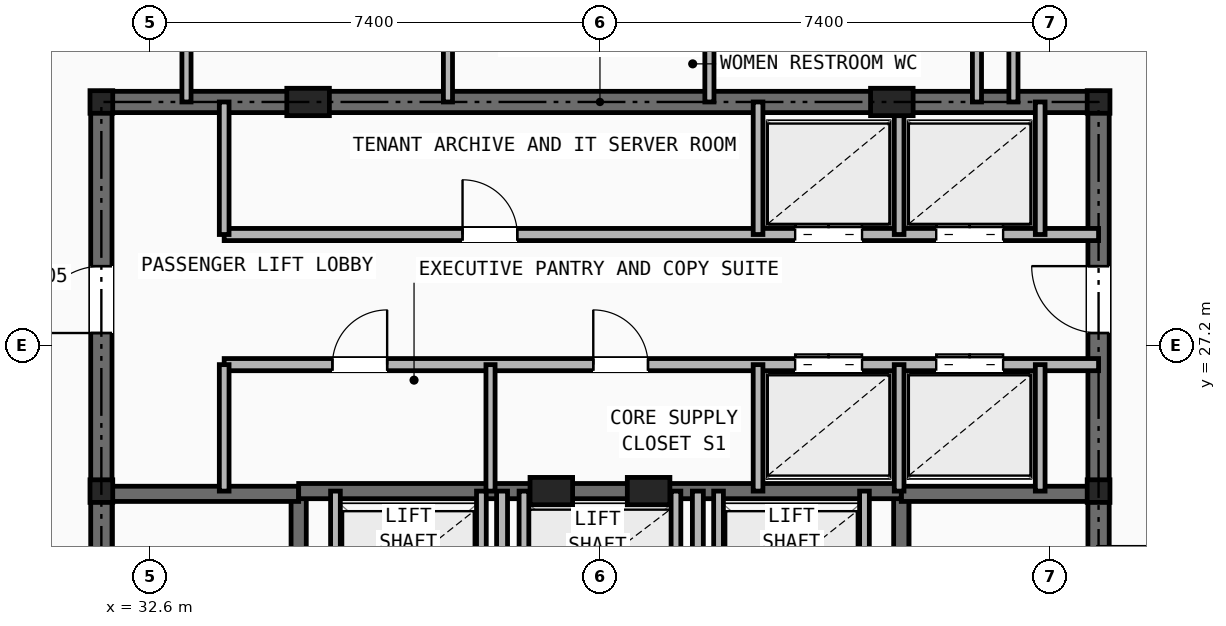
"""IFC4 building model, lengths in metres.
Left out: names, types, materials, properties, quantities, classifications, styles, units other than length and angle.
Written with IfcOpenShell. Run it as: python <this file> out.ifc"""

import sys

from ifc_helpers import new_model, si_unit, direction, frame, frame_2d, origin, origin_2d, place, context, subcontext, project, spatial, rectangle, i_section, extrude, element, fill, save


model = new_model("IFC4")
c1 = context("Model", 3, precision=1e-05, world=origin(), true_north=direction((0.0, 1.0)))
c2 = subcontext(c1, "Body", "Model", "MODEL_VIEW")
j1 = project(units=[si_unit("LENGTHUNIT", "METRE"), si_unit("PLANEANGLEUNIT", "RADIAN")], contexts=[c1])
p1 = place(None, origin())
s1 = spatial("IfcSite", under=j1, at=p1, CompositionType="ELEMENT")
p2 = place(p1, origin())
s2 = spatial("IfcBuilding", under=s1, at=p2, CompositionType="ELEMENT")
p3 = place(p2, frame((0.0, 0.0, 225.9)))
s3 = spatial("IfcBuildingStorey", under=s2, at=p3, CompositionType="ELEMENT", Elevation=225.9)
for number, where, z_axis, x_axis in (
    (1, (31.8, 24.8, 0.0), (0.0, 0.0, 1.0), (1.0, 0.0, 0.0)),
    (2, (48.2, 24.8, 0.0), (0.0, 0.0, 1.0), (1.0, 0.0, 0.0)),
    (3, (31.8, 31.2, 0.0), (0.0, 0.0, 1.0), (1.0, 0.0, 0.0)),
    (4, (48.2, 31.2, 0.0), (0.0, 0.0, 1.0), (1.0, 0.0, 0.0)),
):
    element("IfcColumn", number, at=place(p3, frame(where, z_axis=z_axis, x_axis=x_axis)), inside=s3, PredefinedType="COLUMN", context=c2, shape_type="SweptSolid", body=[
        extrude(i_section(OverallWidth=0.374, OverallDepth=0.372, WebThickness=0.016, FlangeThickness=0.026, at=origin_2d()), origin(), (0.0, 0.0, 1.0), 3.5),
    ])
for number, where, z_axis, x_axis in (
    (5, (35.2, 31.2, 0.0), (0.0, 0.0, 1.0), (1.0, 0.0, 0.0)),
    (6, (44.8, 31.2, 0.0), (0.0, 0.0, 1.0), (1.0, 0.0, 0.0)),
    (7, (39.2, 24.8, 0.0), (0.0, 0.0, 1.0), (1.0, 0.0, 0.0)),
    (8, (40.8, 24.8, 0.0), (0.0, 0.0, 1.0), (1.0, 0.0, 0.0)),
):
    element("IfcColumn", number, at=place(p3, frame(where, z_axis=z_axis, x_axis=x_axis)), inside=s3, PredefinedType="PILASTER", context=c2, shape_type="SweptSolid", body=[
        extrude(rectangle(XDim=0.7, YDim=0.45, at=origin_2d()), origin(), (0.0, 0.0, 1.0), 3.5),
    ])
p4 = place(p3, frame((31.8, 31.2, 0.0), z_axis=(0.0, 0.0, 1.0), x_axis=(1.0, 0.0, 0.0)))
e9 = element("IfcWall", 9, at=p4, inside=s3, PredefinedType="SHEAR", context=c2, shape_type="SweptSolid", body=[
    extrude(rectangle(XDim=16.4, YDim=0.35, at=frame_2d((8.2, 0.0))), origin(), (0.0, 0.0, 1.0), 3.25),
])
p5 = place(p3, frame((31.8, 16.4, 0.0), z_axis=(0.0, 0.0, 1.0), x_axis=(0.0, 1.0, 0.0)))
e10 = element("IfcWall", 10, at=p5, inside=s3, PredefinedType="SHEAR", context=c2, shape_type="SweptSolid", body=[
    extrude(rectangle(XDim=14.8, YDim=0.35, at=frame_2d((7.4, 0.0))), origin(), (0.0, 0.0, 1.0), 3.25),
])
p6 = place(p5, frame((11.0, 0.0, 0.0)))
e11 = element("IfcOpeningElement", 11, at=p6, cuts=e10, PredefinedType="OPENING", context=c2, shape_type="SweptSolid", body=[
    extrude(rectangle(XDim=1.1, YDim=2.15, at=frame_2d((0.55, 1.075))), frame((0.0, 0.185, 0.0), z_axis=(0.0, -1.0, 0.0), x_axis=(1.0, 0.0, 0.0)), (0.0, 0.0, 1.0), 0.37),
])
p7 = place(p3, frame((48.2, 16.4, 0.0), z_axis=(0.0, 0.0, 1.0), x_axis=(0.0, 1.0, 0.0)))
e12 = element("IfcWall", 12, at=p7, inside=s3, PredefinedType="SHEAR", context=c2, shape_type="SweptSolid", body=[
    extrude(rectangle(XDim=14.8, YDim=0.35, at=frame_2d((7.4, 0.0))), origin(), (0.0, 0.0, 1.0), 3.25),
])
p8 = place(p7, frame((11.0, 0.0, 0.0)))
e13 = element("IfcOpeningElement", 13, at=p8, cuts=e12, PredefinedType="OPENING", context=c2, shape_type="SweptSolid", body=[
    extrude(rectangle(XDim=1.1, YDim=2.15, at=frame_2d((0.55, 1.075))), frame((0.0, 0.185, 0.0), z_axis=(0.0, -1.0, 0.0), x_axis=(1.0, 0.0, 0.0)), (0.0, 0.0, 1.0), 0.37),
])
p9 = place(p3, frame((35.045, 16.4, 0.0), z_axis=(0.0, 0.0, 1.0), x_axis=(0.0, 1.0, 0.0)))
e14 = element("IfcWall", 14, at=p9, inside=s3, PredefinedType="SHEAR", context=c2, shape_type="SweptSolid", body=[
    extrude(rectangle(XDim=8.4, YDim=0.25, at=frame_2d((4.2, 0.0))), origin(), (0.0, 0.0, 1.0), 3.25),
])
p10 = place(p9, frame((0.45, 0.0, 0.0)))
e15 = element("IfcOpeningElement", 15, at=p10, cuts=e14, PredefinedType="OPENING", context=c2, shape_type="SweptSolid", body=[
    extrude(rectangle(XDim=0.95, YDim=2.1, at=frame_2d((0.475, 1.05))), frame((0.0, 0.135, 0.0), z_axis=(0.0, -1.0, 0.0), x_axis=(1.0, 0.0, 0.0)), (0.0, 0.0, 1.0), 0.27),
])
p11 = place(p3, frame((31.8, 24.755, 0.0), z_axis=(0.0, 0.0, 1.0), x_axis=(1.0, 0.0, 0.0)))
e16 = element("IfcWall", 16, at=p11, inside=s3, PredefinedType="SHEAR", context=c2, shape_type="SweptSolid", body=[
    extrude(rectangle(XDim=3.245, YDim=0.25, at=frame_2d((1.623, 0.0))), origin(), (0.0, 0.0, 1.0), 3.25),
])
p12 = place(p3, frame((44.955, 16.4, 0.0), z_axis=(0.0, 0.0, 1.0), x_axis=(0.0, 1.0, 0.0)))
e17 = element("IfcWall", 17, at=p12, inside=s3, PredefinedType="SHEAR", context=c2, shape_type="SweptSolid", body=[
    extrude(rectangle(XDim=8.4, YDim=0.25, at=frame_2d((4.2, 0.0))), origin(), (0.0, 0.0, 1.0), 3.25),
])
p13 = place(p12, frame((0.45, 0.0, 0.0)))
e18 = element("IfcOpeningElement", 18, at=p13, cuts=e17, PredefinedType="OPENING", context=c2, shape_type="SweptSolid", body=[
    extrude(rectangle(XDim=0.95, YDim=2.1, at=frame_2d((0.475, 1.05))), frame((0.0, 0.135, 0.0), z_axis=(0.0, -1.0, 0.0), x_axis=(1.0, 0.0, 0.0)), (0.0, 0.0, 1.0), 0.27),
])
p14 = place(p3, frame((44.955, 24.755, 0.0), z_axis=(0.0, 0.0, 1.0), x_axis=(1.0, 0.0, 0.0)))
e19 = element("IfcWall", 19, at=p14, inside=s3, PredefinedType="SHEAR", context=c2, shape_type="SweptSolid", body=[
    extrude(rectangle(XDim=3.245, YDim=0.25, at=frame_2d((1.623, 0.0))), origin(), (0.0, 0.0, 1.0), 3.25),
])
p15 = place(p3, frame((35.045, 24.8, 0.0), z_axis=(0.0, 0.0, 1.0), x_axis=(1.0, 0.0, 0.0)))
e20 = element("IfcWall", 20, at=p15, inside=s3, PredefinedType="SHEAR", context=c2, shape_type="SweptSolid", body=[
    extrude(rectangle(XDim=9.91, YDim=0.25, at=frame_2d((4.955, 0.0))), origin(), (0.0, 0.0, 1.0), 3.25),
])
p16 = place(p3, frame((38.39, 16.4, 0.0), z_axis=(0.0, 0.0, 1.0), x_axis=(0.0, 1.0, 0.0)))
e21 = element("IfcWall", 21, at=p16, inside=s3, PredefinedType="PARTITIONING", context=c2, shape_type="SweptSolid", body=[
    extrude(rectangle(XDim=8.4, YDim=0.18, at=frame_2d((4.2, 0.0))), origin(), (0.0, 0.0, 1.0), 2.705),
])
p17 = place(p16, frame((1.8, 0.0, 0.0)))
e22 = element("IfcOpeningElement", 22, at=p17, cuts=e21, PredefinedType="OPENING", context=c2, shape_type="SweptSolid", body=[
    extrude(rectangle(XDim=0.85, YDim=2.05, at=frame_2d((0.425, 1.025))), frame((0.0, 0.1, 0.0), z_axis=(0.0, -1.0, 0.0), x_axis=(1.0, 0.0, 0.0)), (0.0, 0.0, 1.0), 0.2),
])
p18 = place(p16, frame((4.35, 0.0, 0.0)))
e23 = element("IfcOpeningElement", 23, at=p18, cuts=e21, PredefinedType="OPENING", context=c2, shape_type="SweptSolid", body=[
    extrude(rectangle(XDim=0.95, YDim=2.1, at=frame_2d((0.475, 1.05))), frame((0.0, 0.1, 0.0), z_axis=(0.0, -1.0, 0.0), x_axis=(1.0, 0.0, 0.0)), (0.0, 0.0, 1.0), 0.2),
])
p19 = place(p3, frame((41.61, 16.4, 0.0), z_axis=(0.0, 0.0, 1.0), x_axis=(0.0, 1.0, 0.0)))
e24 = element("IfcWall", 24, at=p19, inside=s3, PredefinedType="PARTITIONING", context=c2, shape_type="SweptSolid", body=[
    extrude(rectangle(XDim=8.4, YDim=0.18, at=frame_2d((4.2, 0.0))), origin(), (0.0, 0.0, 1.0), 2.705),
])
p20 = place(p19, frame((1.8, 0.0, 0.0)))
e25 = element("IfcOpeningElement", 25, at=p20, cuts=e24, PredefinedType="OPENING", context=c2, shape_type="SweptSolid", body=[
    extrude(rectangle(XDim=0.85, YDim=2.05, at=frame_2d((0.425, 1.025))), frame((0.0, 0.1, 0.0), z_axis=(0.0, -1.0, 0.0), x_axis=(1.0, 0.0, 0.0)), (0.0, 0.0, 1.0), 0.2),
])
for number, where, z_axis, x_axis in (
    (26, (35.65, 22.48, 0.0), (0.0, 0.0, 1.0), (0.0, 1.0, 0.0)),
    (27, (38.05, 22.48, 0.0), (0.0, 0.0, 1.0), (0.0, 1.0, 0.0)),
    (28, (41.95, 22.48, 0.0), (0.0, 0.0, 1.0), (0.0, 1.0, 0.0)),
    (29, (44.35, 22.48, 0.0), (0.0, 0.0, 1.0), (0.0, 1.0, 0.0)),
    (30, (38.75, 22.48, 0.0), (0.0, 0.0, 1.0), (0.0, 1.0, 0.0)),
    (31, (41.25, 22.48, 0.0), (0.0, 0.0, 1.0), (0.0, 1.0, 0.0)),
):
    element("IfcWall", number, at=place(p3, frame(where, z_axis=z_axis, x_axis=x_axis)), inside=s3, PredefinedType="SOLIDWALL", context=c2, shape_type="SweptSolid", body=[
        extrude(rectangle(XDim=2.32, YDim=0.16, at=frame_2d((1.16, 0.0))), origin(), (0.0, 0.0, 1.0), 3.25),
    ])
p21 = place(p3, frame((33.82, 29.02, 0.0), z_axis=(0.0, 0.0, 1.0), x_axis=(1.0, 0.0, 0.0)))
e32 = element("IfcWall", 32, at=p21, inside=s3, PredefinedType="SOLIDWALL", context=c2, shape_type="SweptSolid", body=[
    extrude(rectangle(XDim=14.38, YDim=0.2, at=frame_2d((7.19, 0.0))), origin(), (0.0, 0.0, 1.0), 2.705),
])
p22 = place(p21, frame((3.92, 0.0, 0.0)))
e33 = element("IfcOpeningElement", 33, at=p22, cuts=e32, PredefinedType="OPENING", context=c2, shape_type="SweptSolid", body=[
    extrude(rectangle(XDim=0.9, YDim=2.1, at=frame_2d((0.45, 1.05))), frame((0.0, 0.11, 0.0), z_axis=(0.0, -1.0, 0.0), x_axis=(1.0, 0.0, 0.0)), (0.0, 0.0, 1.0), 0.22),
])
p23 = place(p21, frame((9.39, 0.0, 0.0)))
e34 = element("IfcOpeningElement", 34, at=p23, cuts=e32, PredefinedType="OPENING", context=c2, shape_type="SweptSolid", body=[
    extrude(rectangle(XDim=1.1, YDim=2.15, at=frame_2d((0.55, 1.075))), frame((0.0, 0.11, 0.0), z_axis=(0.0, -1.0, 0.0), x_axis=(1.0, 0.0, 0.0)), (0.0, 0.0, 1.0), 0.22),
])
p24 = place(p21, frame((11.71, 0.0, 0.0)))
e35 = element("IfcOpeningElement", 35, at=p24, cuts=e32, PredefinedType="OPENING", context=c2, shape_type="SweptSolid", body=[
    extrude(rectangle(XDim=1.1, YDim=2.15, at=frame_2d((0.55, 1.075))), frame((0.0, 0.11, 0.0), z_axis=(0.0, -1.0, 0.0), x_axis=(1.0, 0.0, 0.0)), (0.0, 0.0, 1.0), 0.22),
])
p25 = place(p3, frame((33.82, 26.88, 0.0), z_axis=(0.0, 0.0, 1.0), x_axis=(1.0, 0.0, 0.0)))
e36 = element("IfcWall", 36, at=p25, inside=s3, PredefinedType="SOLIDWALL", context=c2, shape_type="SweptSolid", body=[
    extrude(rectangle(XDim=14.38, YDim=0.2, at=frame_2d((7.19, 0.0))), origin(), (0.0, 0.0, 1.0), 2.705),
])
p26 = place(p25, frame((1.78, 0.0, 0.0)))
e37 = element("IfcOpeningElement", 37, at=p26, cuts=e36, PredefinedType="OPENING", context=c2, shape_type="SweptSolid", body=[
    extrude(rectangle(XDim=0.9, YDim=2.1, at=frame_2d((0.45, 1.05))), frame((0.0, 0.11, 0.0), z_axis=(0.0, -1.0, 0.0), x_axis=(1.0, 0.0, 0.0)), (0.0, 0.0, 1.0), 0.22),
])
p27 = place(p25, frame((6.07, 0.0, 0.0)))
e38 = element("IfcOpeningElement", 38, at=p27, cuts=e36, PredefinedType="OPENING", context=c2, shape_type="SweptSolid", body=[
    extrude(rectangle(XDim=0.9, YDim=2.1, at=frame_2d((0.45, 1.05))), frame((0.0, 0.11, 0.0), z_axis=(0.0, -1.0, 0.0), x_axis=(1.0, 0.0, 0.0)), (0.0, 0.0, 1.0), 0.22),
])
p28 = place(p25, frame((9.39, 0.0, 0.0)))
e39 = element("IfcOpeningElement", 39, at=p28, cuts=e36, PredefinedType="OPENING", context=c2, shape_type="SweptSolid", body=[
    extrude(rectangle(XDim=1.1, YDim=2.15, at=frame_2d((0.55, 1.075))), frame((0.0, 0.11, 0.0), z_axis=(0.0, -1.0, 0.0), x_axis=(1.0, 0.0, 0.0)), (0.0, 0.0, 1.0), 0.22),
])
p29 = place(p25, frame((11.71, 0.0, 0.0)))
e40 = element("IfcOpeningElement", 40, at=p29, cuts=e36, PredefinedType="OPENING", context=c2, shape_type="SweptSolid", body=[
    extrude(rectangle(XDim=1.1, YDim=2.15, at=frame_2d((0.55, 1.075))), frame((0.0, 0.11, 0.0), z_axis=(0.0, -1.0, 0.0), x_axis=(1.0, 0.0, 0.0)), (0.0, 0.0, 1.0), 0.22),
])
p30 = place(p3, frame((33.82, 29.02, 0.0), z_axis=(0.0, 0.0, 1.0), x_axis=(0.0, 1.0, 0.0)))
e41 = element("IfcWall", 41, at=p30, inside=s3, PredefinedType="SOLIDWALL", context=c2, shape_type="SweptSolid", body=[
    extrude(rectangle(XDim=2.18, YDim=0.16, at=frame_2d((1.09, 0.0))), origin(), (0.0, 0.0, 1.0), 2.705),
])
p31 = place(p3, frame((33.82, 24.8, 0.0), z_axis=(0.0, 0.0, 1.0), x_axis=(0.0, 1.0, 0.0)))
e42 = element("IfcWall", 42, at=p31, inside=s3, PredefinedType="SOLIDWALL", context=c2, shape_type="SweptSolid", body=[
    extrude(rectangle(XDim=2.08, YDim=0.16, at=frame_2d((1.04, 0.0))), origin(), (0.0, 0.0, 1.0), 3.25),
])
p32 = place(p3, frame((38.2, 24.8, 0.0), z_axis=(0.0, 0.0, 1.0), x_axis=(0.0, 1.0, 0.0)))
e43 = element("IfcWall", 43, at=p32, inside=s3, PredefinedType="PARTITIONING", context=c2, shape_type="SweptSolid", body=[
    extrude(rectangle(XDim=2.08, YDim=0.15, at=frame_2d((1.04, 0.0))), origin(), (0.0, 0.0, 1.0), 3.25),
])
for number, where, z_axis, x_axis in (
    (44, (42.6, 29.02, 0.0), (0.0, 0.0, 1.0), (0.0, 1.0, 0.0)),
    (45, (44.92, 29.02, 0.0), (0.0, 0.0, 1.0), (0.0, 1.0, 0.0)),
    (46, (47.24, 29.02, 0.0), (0.0, 0.0, 1.0), (0.0, 1.0, 0.0)),
):
    element("IfcWall", number, at=place(p3, frame(where, z_axis=z_axis, x_axis=x_axis)), inside=s3, PredefinedType="SOLIDWALL", context=c2, shape_type="SweptSolid", body=[
        extrude(rectangle(XDim=2.18, YDim=0.16, at=frame_2d((1.09, 0.0))), origin(), (0.0, 0.0, 1.0), 2.705),
    ])
for number, where, z_axis, x_axis in (
    (47, (42.6, 24.8, 0.0), (0.0, 0.0, 1.0), (0.0, 1.0, 0.0)),
    (48, (44.92, 24.8, 0.0), (0.0, 0.0, 1.0), (0.0, 1.0, 0.0)),
    (49, (47.24, 24.8, 0.0), (0.0, 0.0, 1.0), (0.0, 1.0, 0.0)),
):
    element("IfcWall", number, at=place(p3, frame(where, z_axis=z_axis, x_axis=x_axis)), inside=s3, PredefinedType="SOLIDWALL", context=c2, shape_type="SweptSolid", body=[
        extrude(rectangle(XDim=2.08, YDim=0.16, at=frame_2d((1.04, 0.0))), origin(), (0.0, 0.0, 1.0), 3.25),
    ])
for number, where, z_axis, x_axis in (
    (50, (33.2, 31.2, 0.0), (0.0, 0.0, 1.0), (0.0, 1.0, 0.0)),
    (51, (46.2, 31.2, 0.0), (0.0, 0.0, 1.0), (0.0, 1.0, 0.0)),
    (52, (37.5, 31.2, 0.0), (0.0, 0.0, 1.0), (0.0, 1.0, 0.0)),
    (53, (41.8, 31.2, 0.0), (0.0, 0.0, 1.0), (0.0, 1.0, 0.0)),
):
    element("IfcWall", number, at=place(p3, frame(where, z_axis=z_axis, x_axis=x_axis)), inside=s3, PredefinedType="PARTITIONING", context=c2, shape_type="SweptSolid", body=[
        extrude(rectangle(XDim=2.6, YDim=0.15, at=frame_2d((1.3, 0.0))), origin(), (0.0, 0.0, 1.0), 2.705),
    ])
p33 = place(p3, frame((46.8, 31.2, 0.0), z_axis=(0.0, 0.0, 1.0), x_axis=(0.0, 1.0, 0.0)))
e54 = element("IfcWall", 54, at=p33, inside=s3, PredefinedType="PARTITIONING", context=c2, shape_type="SweptSolid", body=[
    extrude(rectangle(XDim=4.5, YDim=0.15, at=frame_2d((2.25, 0.0))), origin(), (0.0, 0.0, 1.0), 2.705),
])
p34 = place(p6, origin())
e55 = element("IfcDoor", 55, at=p34, inside=s3, OperationType="SINGLE_SWING_LEFT", PredefinedType="DOOR", context=c2, shape_type="SweptSolid", body=[
    extrude(rectangle(XDim=1.1, YDim=2.15, at=frame_2d((0.55, 1.075))), frame((0.0, 0.025, 0.0), z_axis=(0.0, -1.0, 0.0), x_axis=(1.0, 0.0, 0.0)), (0.0, 0.0, 1.0), 0.05),
])
fill(e11, e55)
p35 = place(p8, origin())
e56 = element("IfcDoor", 56, at=p35, inside=s3, OperationType="SINGLE_SWING_RIGHT", PredefinedType="DOOR", context=c2, shape_type="SweptSolid", body=[
    extrude(rectangle(XDim=1.1, YDim=2.15, at=frame_2d((0.55, 1.075))), frame((0.0, 0.025, 0.0), z_axis=(0.0, -1.0, 0.0), x_axis=(1.0, 0.0, 0.0)), (0.0, 0.0, 1.0), 0.05),
])
fill(e13, e56)
p36 = place(p22, origin())
e57 = element("IfcDoor", 57, at=p36, inside=s3, OperationType="SINGLE_SWING_LEFT", PredefinedType="DOOR", context=c2, shape_type="SweptSolid", body=[
    extrude(rectangle(XDim=0.9, YDim=2.1, at=frame_2d((0.45, 1.05))), frame((0.0, 0.025, 0.0), z_axis=(0.0, -1.0, 0.0), x_axis=(1.0, 0.0, 0.0)), (0.0, 0.0, 1.0), 0.05),
])
fill(e33, e57)
p37 = place(p26, origin())
e58 = element("IfcDoor", 58, at=p37, inside=s3, OperationType="SINGLE_SWING_RIGHT", PredefinedType="DOOR", context=c2, shape_type="SweptSolid", body=[
    extrude(rectangle(XDim=0.9, YDim=2.1, at=frame_2d((0.45, 1.05))), frame((0.0, 0.025, 0.0), z_axis=(0.0, -1.0, 0.0), x_axis=(1.0, 0.0, 0.0)), (0.0, 0.0, 1.0), 0.05),
])
fill(e37, e58)
p38 = place(p27, origin())
e59 = element("IfcDoor", 59, at=p38, inside=s3, OperationType="SINGLE_SWING_LEFT", PredefinedType="DOOR", context=c2, shape_type="SweptSolid", body=[
    extrude(rectangle(XDim=0.9, YDim=2.1, at=frame_2d((0.45, 1.05))), frame((0.0, 0.025, 0.0), z_axis=(0.0, -1.0, 0.0), x_axis=(1.0, 0.0, 0.0)), (0.0, 0.0, 1.0), 0.05),
])
fill(e38, e59)
p39 = place(p23, origin())
e60 = element("IfcDoor", 60, at=p39, inside=s3, OperationType="DOUBLE_DOOR_SLIDING", PredefinedType="DOOR", context=c2, shape_type="SweptSolid", body=[
    extrude(rectangle(XDim=1.1, YDim=2.15, at=frame_2d((0.55, 1.075))), frame((0.0, 0.025, 0.0), z_axis=(0.0, -1.0, 0.0), x_axis=(1.0, 0.0, 0.0)), (0.0, 0.0, 1.0), 0.05),
])
fill(e34, e60)
p40 = place(p24, origin())
e61 = element("IfcDoor", 61, at=p40, inside=s3, OperationType="DOUBLE_DOOR_SLIDING", PredefinedType="DOOR", context=c2, shape_type="SweptSolid", body=[
    extrude(rectangle(XDim=1.1, YDim=2.15, at=frame_2d((0.55, 1.075))), frame((0.0, 0.025, 0.0), z_axis=(0.0, -1.0, 0.0), x_axis=(1.0, 0.0, 0.0)), (0.0, 0.0, 1.0), 0.05),
])
fill(e35, e61)
p41 = place(p28, origin())
e62 = element("IfcDoor", 62, at=p41, inside=s3, OperationType="DOUBLE_DOOR_SLIDING", PredefinedType="DOOR", context=c2, shape_type="SweptSolid", body=[
    extrude(rectangle(XDim=1.1, YDim=2.15, at=frame_2d((0.55, 1.075))), frame((0.0, 0.025, 0.0), z_axis=(0.0, -1.0, 0.0), x_axis=(1.0, 0.0, 0.0)), (0.0, 0.0, 1.0), 0.05),
])
fill(e39, e62)
p42 = place(p29, origin())
e63 = element("IfcDoor", 63, at=p42, inside=s3, OperationType="DOUBLE_DOOR_SLIDING", PredefinedType="DOOR", context=c2, shape_type="SweptSolid", body=[
    extrude(rectangle(XDim=1.1, YDim=2.15, at=frame_2d((0.55, 1.075))), frame((0.0, 0.025, 0.0), z_axis=(0.0, -1.0, 0.0), x_axis=(1.0, 0.0, 0.0)), (0.0, 0.0, 1.0), 0.05),
])
fill(e40, e63)
save(model, sys.argv[1])
